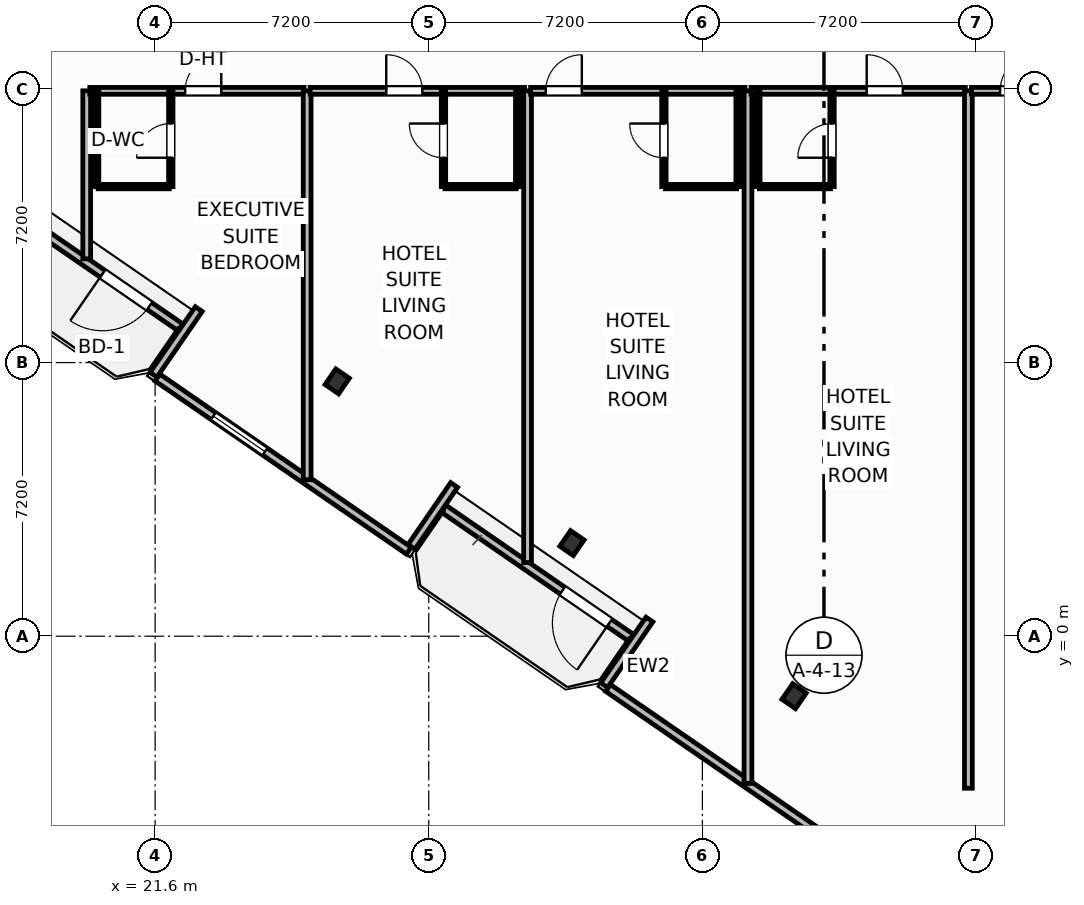
"""IFC4 building model, lengths in metres.
Left out: names, types, materials, properties, quantities, classifications, styles, units other than length and angle.
Written with IfcOpenShell. Run it as: python <this file> out.ifc"""

import sys

from ifc_helpers import new_model, si_unit, direction, frame, frame_2d, origin, origin_2d, place, context, subcontext, project, spatial, rectangle, i_section, extrude, element, fill, save


model = new_model("IFC4")
c1 = context("Model", 3, precision=1e-05, world=origin(), true_north=direction((0.0, 1.0)))
c2 = subcontext(c1, "Body", "Model", "MODEL_VIEW")
j1 = project(units=[si_unit("LENGTHUNIT", "METRE"), si_unit("PLANEANGLEUNIT", "RADIAN")], contexts=[c1])
p1 = place(None, origin())
s1 = spatial("IfcSite", under=j1, at=p1, CompositionType="ELEMENT")
p2 = place(p1, origin())
s2 = spatial("IfcBuilding", under=s1, at=p2, CompositionType="ELEMENT")
p3 = place(p2, frame((0.0, 0.0, 67.7)))
s3 = spatial("IfcBuildingStorey", under=s2, at=p3, CompositionType="ELEMENT", Elevation=67.7)
for number, where, z_axis, x_axis in (
    (1, (26.391, 6.705, 0.0), (0.0, 0.0, 1.0), (0.824, -0.567, 0.0)),
    (2, (32.568, 2.45, 0.0), (0.0, 0.0, 1.0), (0.824, -0.567, 0.0)),
    (3, (38.415, -1.577, 0.0), (0.0, 0.0, 1.0), (0.824, -0.567, 0.0)),
):
    element("IfcColumn", number, at=place(p3, frame(where, z_axis=z_axis, x_axis=x_axis)), inside=s3, PredefinedType="COLUMN", context=c2, shape_type="SweptSolid", body=[
        extrude(i_section(OverallWidth=0.432, OverallDepth=0.498, WebThickness=0.056, FlangeThickness=0.089, FilletRadius=0.025, at=origin_2d()), origin(), (0.0, 0.0, 1.0), 3.7),
    ])
p4 = place(p3, frame((22.269, 8.124, 0.0), z_axis=(0.0, 0.0, 1.0), x_axis=(-0.823534636215, 0.567265989598, 0.0)))
e4 = element("IfcWall", 4, at=p4, inside=s3, PredefinedType="SOLIDWALL", context=c2, shape_type="SweptSolid", body=[
    extrude(rectangle(XDim=6.0, YDim=0.22, at=frame_2d((3.0, 0.0))), origin(), (0.0, 0.0, 1.0), 2.66),
])
p5 = place(p4, frame((0.992, 0.0, 0.0)))
e5 = element("IfcOpeningElement", 5, at=p5, cuts=e4, PredefinedType="OPENING", context=c2, shape_type="SweptSolid", body=[
    extrude(rectangle(XDim=1.5, YDim=2.25, at=frame_2d((0.75, 1.125))), frame((0.0, 0.12, 0.0), z_axis=(0.0, -1.0, 0.0), x_axis=(1.0, 0.0, 0.0)), (0.0, 0.0, 1.0), 0.24),
])
p6 = place(p3, frame((34.127, -0.045, 0.0), z_axis=(0.0, 0.0, 1.0), x_axis=(-0.823534636215, 0.567265989598, 0.0)))
e6 = element("IfcWall", 6, at=p6, inside=s3, PredefinedType="SOLIDWALL", context=c2, shape_type="SweptSolid", body=[
    extrude(rectangle(XDim=6.0, YDim=0.22, at=frame_2d((3.0, 0.0))), origin(), (0.0, 0.0, 1.0), 2.66),
])
p7 = place(p6, frame((0.696, 0.0, 0.0)))
e7 = element("IfcOpeningElement", 7, at=p7, cuts=e6, PredefinedType="OPENING", context=c2, shape_type="SweptSolid", body=[
    extrude(rectangle(XDim=1.5, YDim=2.25, at=frame_2d((0.75, 1.125))), frame((0.0, 0.12, 0.0), z_axis=(0.0, -1.0, 0.0), x_axis=(1.0, 0.0, 0.0)), (0.0, 0.0, 1.0), 0.24),
])
p8 = place(p3, frame((22.747, 8.607, 0.0), z_axis=(0.0, 0.0, 1.0), x_axis=(-0.567219383419, -0.823566737474, 0.0)))
e8 = element("IfcWall", 8, at=p8, inside=s3, PredefinedType="SOLIDWALL", context=c2, shape_type="SweptSolid", body=[
    extrude(rectangle(XDim=2.1, YDim=0.22, at=frame_2d((1.05, 0.0))), origin(), (0.0, 0.0, 1.0), 2.66),
])
p9 = place(p3, frame((21.659, 6.807, 0.0), z_axis=(0.0, 0.0, 1.0), x_axis=(0.823535360023, -0.567264938799, 0.0)))
e9 = element("IfcWall", 9, at=p9, inside=s3, PredefinedType="SOLIDWALL", context=c2, shape_type="SweptSolid", body=[
    extrude(rectangle(XDim=8.035, YDim=0.22, at=frame_2d((4.018, 0.0))), origin(), (0.0, 0.0, 1.0), 2.66),
])
p10 = place(p9, frame((1.788, 0.0, 0.8)))
e10 = element("IfcOpeningElement", 10, at=p10, cuts=e9, PredefinedType="OPENING", context=c2, shape_type="SweptSolid", body=[
    extrude(rectangle(XDim=1.65, YDim=1.65, at=frame_2d((0.825, 0.825))), frame((0.0, 0.12, 0.0), z_axis=(0.0, -1.0, 0.0), x_axis=(1.0, 0.0, 0.0)), (0.0, 0.0, 1.0), 0.24),
])
p11 = place(p3, frame((28.347, 2.352, 0.0), z_axis=(0.0, 0.0, 1.0), x_axis=(0.567215821234, 0.823569190865, 0.0)))
e11 = element("IfcWall", 11, at=p11, inside=s3, PredefinedType="SOLIDWALL", context=c2, shape_type="SweptSolid", body=[
    extrude(rectangle(XDim=1.975, YDim=0.22, at=frame_2d((0.988, 0.0))), origin(), (0.0, 0.0, 1.0), 2.66),
])
p12 = place(p3, frame((34.606, 0.439, 0.0), z_axis=(0.0, 0.0, 1.0), x_axis=(-0.567219383419, -0.823566737474, 0.0)))
e12 = element("IfcWall", 12, at=p12, inside=s3, PredefinedType="SOLIDWALL", context=c2, shape_type="SweptSolid", body=[
    extrude(rectangle(XDim=2.1, YDim=0.22, at=frame_2d((1.05, 0.0))), origin(), (0.0, 0.0, 1.0), 2.66),
])
p13 = place(p3, frame((33.518, -1.362, 0.0), z_axis=(0.0, 0.0, 1.0), x_axis=(0.82353935489, -0.567259139148, 0.0)))
e13 = element("IfcWall", 13, at=p13, inside=s3, PredefinedType="SOLIDWALL", context=c2, shape_type="SweptSolid", body=[
    extrude(rectangle(XDim=23.147, YDim=0.22, at=frame_2d((11.573, 0.0))), origin(), (0.0, 0.0, 1.0), 2.66),
])
p14 = place(p13, frame((10.749, 0.0, 0.8)))
e14 = element("IfcOpeningElement", 14, at=p14, cuts=e13, PredefinedType="OPENING", context=c2, shape_type="SweptSolid", body=[
    extrude(rectangle(XDim=1.65, YDim=1.65, at=frame_2d((0.825, 0.825))), frame((0.0, 0.12, 0.0), z_axis=(0.0, -1.0, 0.0), x_axis=(1.0, 0.0, 0.0)), (0.0, 0.0, 1.0), 0.24),
])
p15 = place(p3, frame((19.8, 9.929, 0.0), z_axis=(0.0, 0.0, 1.0), x_axis=(0.0, 1.0, 0.0)))
e15 = element("IfcWall", 15, at=p15, inside=s3, PredefinedType="PARTITIONING", context=c2, shape_type="SweptSolid", body=[
    extrude(rectangle(XDim=4.421, YDim=0.205, at=frame_2d((2.21, 0.0))), origin(), (0.0, 0.0, 1.0), 3.38),
])
p16 = place(p3, frame((19.88, 14.35, 0.0), z_axis=(0.0, 0.0, 1.0), x_axis=(1.0, 0.0, 0.0)))
e16 = element("IfcWall", 16, at=p16, inside=s3, PredefinedType="PARTITIONING", context=c2, shape_type="SweptSolid", body=[
    extrude(rectangle(XDim=5.64, YDim=0.18, at=frame_2d((2.82, 0.0))), origin(), (0.0, 0.0, 1.0), 3.38),
])
p17 = place(p16, frame((2.51, 0.0, 0.0)))
e17 = element("IfcOpeningElement", 17, at=p17, cuts=e16, PredefinedType="OPENING", context=c2, shape_type="SweptSolid", body=[
    extrude(rectangle(XDim=0.95, YDim=2.15, at=frame_2d((0.475, 1.075))), frame((0.0, 0.1, 0.0), z_axis=(0.0, -1.0, 0.0), x_axis=(1.0, 0.0, 0.0)), (0.0, 0.0, 1.0), 0.2),
])
p18 = place(p3, frame((20.1, 11.83, 0.0), z_axis=(0.0, 0.0, 1.0), x_axis=(1.0, 0.0, 0.0)))
e18 = element("IfcWall", 18, at=p18, inside=s3, PredefinedType="PARTITIONING", context=c2, shape_type="SweptSolid", body=[
    extrude(rectangle(XDim=1.872, YDim=0.115, at=frame_2d((0.936, 0.0))), origin(), (0.0, 0.0, 1.0), 3.38),
])
p19 = place(p3, frame((22.012, 11.83, 0.0), z_axis=(0.0, 0.0, 1.0), x_axis=(0.0, 1.0, 0.0)))
e19 = element("IfcWall", 19, at=p19, inside=s3, PredefinedType="PARTITIONING", context=c2, shape_type="SweptSolid", body=[
    extrude(rectangle(XDim=2.52, YDim=0.115, at=frame_2d((1.26, 0.0))), origin(), (0.0, 0.0, 1.0), 3.38),
])
p20 = place(p19, frame((0.76, 0.0, 0.0)))
e20 = element("IfcOpeningElement", 20, at=p20, cuts=e19, PredefinedType="OPENING", context=c2, shape_type="SweptSolid", body=[
    extrude(rectangle(XDim=0.9, YDim=2.05, at=frame_2d((0.45, 1.025))), frame((0.0, 0.067, 0.0), z_axis=(0.0, -1.0, 0.0), x_axis=(1.0, 0.0, 0.0)), (0.0, 0.0, 1.0), 0.135),
])
p21 = place(p3, frame((20.06, 11.83, 0.0), z_axis=(0.0, 0.0, 1.0), x_axis=(0.0, 1.0, 0.0)))
e21 = element("IfcWall", 21, at=p21, inside=s3, PredefinedType="PARTITIONING", context=c2, shape_type="SweptSolid", body=[
    extrude(rectangle(XDim=2.52, YDim=0.115, at=frame_2d((1.26, 0.0))), origin(), (0.0, 0.0, 1.0), 3.38),
])
p22 = place(p3, frame((25.6, 4.117, 0.0), z_axis=(0.0, 0.0, 1.0), x_axis=(0.0, 1.0, 0.0)))
e22 = element("IfcWall", 22, at=p22, inside=s3, PredefinedType="PARTITIONING", context=c2, shape_type="SweptSolid", body=[
    extrude(rectangle(XDim=10.233, YDim=0.205, at=frame_2d((5.117, 0.0))), origin(), (0.0, 0.0, 1.0), 1.165),
])
p23 = place(p3, frame((25.68, 14.35, 0.0), z_axis=(0.0, 0.0, 1.0), x_axis=(1.0, 0.0, 0.0)))
e23 = element("IfcWall", 23, at=p23, inside=s3, PredefinedType="PARTITIONING", context=c2, shape_type="SweptSolid", body=[
    extrude(rectangle(XDim=5.64, YDim=0.18, at=frame_2d((2.82, 0.0))), origin(), (0.0, 0.0, 1.0), 3.38),
])
p24 = place(p23, frame((2.002, 0.0, 0.0)))
e24 = element("IfcOpeningElement", 24, at=p24, cuts=e23, PredefinedType="OPENING", context=c2, shape_type="SweptSolid", body=[
    extrude(rectangle(XDim=0.95, YDim=2.15, at=frame_2d((0.475, 1.075))), frame((0.0, 0.1, 0.0), z_axis=(0.0, -1.0, 0.0), x_axis=(1.0, 0.0, 0.0)), (0.0, 0.0, 1.0), 0.2),
])
p25 = place(p3, frame((29.228, 11.83, 0.0), z_axis=(0.0, 0.0, 1.0), x_axis=(1.0, 0.0, 0.0)))
e25 = element("IfcWall", 25, at=p25, inside=s3, PredefinedType="PARTITIONING", context=c2, shape_type="SweptSolid", body=[
    extrude(rectangle(XDim=1.872, YDim=0.115, at=frame_2d((0.936, 0.0))), origin(), (0.0, 0.0, 1.0), 3.38),
])
p26 = place(p3, frame((29.188, 11.83, 0.0), z_axis=(0.0, 0.0, 1.0), x_axis=(0.0, 1.0, 0.0)))
e26 = element("IfcWall", 26, at=p26, inside=s3, PredefinedType="PARTITIONING", context=c2, shape_type="SweptSolid", body=[
    extrude(rectangle(XDim=2.52, YDim=0.115, at=frame_2d((1.26, 0.0))), origin(), (0.0, 0.0, 1.0), 3.38),
])
p27 = place(p26, frame((0.76, 0.0, 0.0)))
e27 = element("IfcOpeningElement", 27, at=p27, cuts=e26, PredefinedType="OPENING", context=c2, shape_type="SweptSolid", body=[
    extrude(rectangle(XDim=0.9, YDim=2.05, at=frame_2d((0.45, 1.025))), frame((0.0, 0.067, 0.0), z_axis=(0.0, -1.0, 0.0), x_axis=(1.0, 0.0, 0.0)), (0.0, 0.0, 1.0), 0.135),
])
p28 = place(p3, frame((31.14, 11.83, 0.0), z_axis=(0.0, 0.0, 1.0), x_axis=(0.0, 1.0, 0.0)))
e28 = element("IfcWall", 28, at=p28, inside=s3, PredefinedType="PARTITIONING", context=c2, shape_type="SweptSolid", body=[
    extrude(rectangle(XDim=2.52, YDim=0.115, at=frame_2d((1.26, 0.0))), origin(), (0.0, 0.0, 1.0), 3.38),
])
p29 = place(p3, frame((31.4, 1.939, 0.0), z_axis=(0.0, 0.0, 1.0), x_axis=(0.0, 1.0, 0.0)))
e29 = element("IfcWall", 29, at=p29, inside=s3, PredefinedType="PARTITIONING", context=c2, shape_type="SweptSolid", body=[
    extrude(rectangle(XDim=12.411, YDim=0.205, at=frame_2d((6.206, 0.0))), origin(), (0.0, 0.0, 1.0), 3.38),
])
p30 = place(p3, frame((31.48, 14.35, 0.0), z_axis=(0.0, 0.0, 1.0), x_axis=(1.0, 0.0, 0.0)))
e30 = element("IfcWall", 30, at=p30, inside=s3, PredefinedType="PARTITIONING", context=c2, shape_type="SweptSolid", body=[
    extrude(rectangle(XDim=5.64, YDim=0.18, at=frame_2d((2.82, 0.0))), origin(), (0.0, 0.0, 1.0), 3.38),
])
p31 = place(p30, frame((0.398, 0.0, 0.0)))
e31 = element("IfcOpeningElement", 31, at=p31, cuts=e30, PredefinedType="OPENING", context=c2, shape_type="SweptSolid", body=[
    extrude(rectangle(XDim=0.95, YDim=2.15, at=frame_2d((0.475, 1.075))), frame((0.0, 0.1, 0.0), z_axis=(0.0, -1.0, 0.0), x_axis=(1.0, 0.0, 0.0)), (0.0, 0.0, 1.0), 0.2),
])
p32 = place(p3, frame((35.028, 11.83, 0.0), z_axis=(0.0, 0.0, 1.0), x_axis=(1.0, 0.0, 0.0)))
e32 = element("IfcWall", 32, at=p32, inside=s3, PredefinedType="PARTITIONING", context=c2, shape_type="SweptSolid", body=[
    extrude(rectangle(XDim=1.872, YDim=0.115, at=frame_2d((0.936, 0.0))), origin(), (0.0, 0.0, 1.0), 3.38),
])
p33 = place(p3, frame((34.988, 11.83, 0.0), z_axis=(0.0, 0.0, 1.0), x_axis=(0.0, 1.0, 0.0)))
e33 = element("IfcWall", 33, at=p33, inside=s3, PredefinedType="PARTITIONING", context=c2, shape_type="SweptSolid", body=[
    extrude(rectangle(XDim=2.52, YDim=0.115, at=frame_2d((1.26, 0.0))), origin(), (0.0, 0.0, 1.0), 3.38),
])
p34 = place(p33, frame((0.76, 0.0, 0.0)))
e34 = element("IfcOpeningElement", 34, at=p34, cuts=e33, PredefinedType="OPENING", context=c2, shape_type="SweptSolid", body=[
    extrude(rectangle(XDim=0.9, YDim=2.05, at=frame_2d((0.45, 1.025))), frame((0.0, 0.067, 0.0), z_axis=(0.0, -1.0, 0.0), x_axis=(1.0, 0.0, 0.0)), (0.0, 0.0, 1.0), 0.135),
])
p35 = place(p3, frame((36.94, 11.83, 0.0), z_axis=(0.0, 0.0, 1.0), x_axis=(0.0, 1.0, 0.0)))
e35 = element("IfcWall", 35, at=p35, inside=s3, PredefinedType="PARTITIONING", context=c2, shape_type="SweptSolid", body=[
    extrude(rectangle(XDim=2.52, YDim=0.115, at=frame_2d((1.26, 0.0))), origin(), (0.0, 0.0, 1.0), 3.38),
])
p36 = place(p3, frame((37.2, -3.874, 0.0), z_axis=(0.0, 0.0, 1.0), x_axis=(0.0, 1.0, 0.0)))
e36 = element("IfcWall", 36, at=p36, inside=s3, PredefinedType="PARTITIONING", context=c2, shape_type="SweptSolid", body=[
    extrude(rectangle(XDim=18.224, YDim=0.205, at=frame_2d((9.112, 0.0))), origin(), (0.0, 0.0, 1.0), 3.38),
])
p37 = place(p3, frame((37.28, 14.35, 0.0), z_axis=(0.0, 0.0, 1.0), x_axis=(1.0, 0.0, 0.0)))
e37 = element("IfcWall", 37, at=p37, inside=s3, PredefinedType="PARTITIONING", context=c2, shape_type="SweptSolid", body=[
    extrude(rectangle(XDim=5.64, YDim=0.18, at=frame_2d((2.82, 0.0))), origin(), (0.0, 0.0, 1.0), 3.38),
])
p38 = place(p37, frame((3.045, 0.0, 0.0)))
e38 = element("IfcOpeningElement", 38, at=p38, cuts=e37, PredefinedType="OPENING", context=c2, shape_type="SweptSolid", body=[
    extrude(rectangle(XDim=0.95, YDim=2.15, at=frame_2d((0.475, 1.075))), frame((0.0, 0.1, 0.0), z_axis=(0.0, -1.0, 0.0), x_axis=(1.0, 0.0, 0.0)), (0.0, 0.0, 1.0), 0.2),
])
p39 = place(p3, frame((37.5, 11.83, 0.0), z_axis=(0.0, 0.0, 1.0), x_axis=(1.0, 0.0, 0.0)))
e39 = element("IfcWall", 39, at=p39, inside=s3, PredefinedType="PARTITIONING", context=c2, shape_type="SweptSolid", body=[
    extrude(rectangle(XDim=1.872, YDim=0.115, at=frame_2d((0.936, 0.0))), origin(), (0.0, 0.0, 1.0), 3.38),
])
p40 = place(p3, frame((39.412, 11.83, 0.0), z_axis=(0.0, 0.0, 1.0), x_axis=(0.0, 1.0, 0.0)))
e40 = element("IfcWall", 40, at=p40, inside=s3, PredefinedType="PARTITIONING", context=c2, shape_type="SweptSolid", body=[
    extrude(rectangle(XDim=2.52, YDim=0.115, at=frame_2d((1.26, 0.0))), origin(), (0.0, 0.0, 1.0), 3.38),
])
p41 = place(p40, frame((0.76, 0.0, 0.0)))
e41 = element("IfcOpeningElement", 41, at=p41, cuts=e40, PredefinedType="OPENING", context=c2, shape_type="SweptSolid", body=[
    extrude(rectangle(XDim=0.9, YDim=2.05, at=frame_2d((0.45, 1.025))), frame((0.0, 0.067, 0.0), z_axis=(0.0, -1.0, 0.0), x_axis=(1.0, 0.0, 0.0)), (0.0, 0.0, 1.0), 0.135),
])
p42 = place(p3, frame((37.46, 11.83, 0.0), z_axis=(0.0, 0.0, 1.0), x_axis=(0.0, 1.0, 0.0)))
e42 = element("IfcWall", 42, at=p42, inside=s3, PredefinedType="PARTITIONING", context=c2, shape_type="SweptSolid", body=[
    extrude(rectangle(XDim=2.52, YDim=0.115, at=frame_2d((1.26, 0.0))), origin(), (0.0, 0.0, 1.0), 3.38),
])
p43 = place(p3, frame((43.0, -4.0, 0.0), z_axis=(0.0, 0.0, 1.0), x_axis=(0.0, 1.0, 0.0)))
e43 = element("IfcWall", 43, at=p43, inside=s3, PredefinedType="PARTITIONING", context=c2, shape_type="SweptSolid", body=[
    extrude(rectangle(XDim=18.35, YDim=0.205, at=frame_2d((9.175, 0.0))), origin(), (0.0, 0.0, 1.0), 1.165),
])
p44 = place(p3, frame((43.08, 14.35, 0.0), z_axis=(0.0, 0.0, 1.0), x_axis=(1.0, 0.0, 0.0)))
e44 = element("IfcWall", 44, at=p44, inside=s3, PredefinedType="PARTITIONING", context=c2, shape_type="SweptSolid", body=[
    extrude(rectangle(XDim=5.64, YDim=0.18, at=frame_2d((2.82, 0.0))), origin(), (0.0, 0.0, 1.0), 3.38),
])
p45 = place(p44, frame((0.754, 0.0, 0.0)))
e45 = element("IfcOpeningElement", 45, at=p45, cuts=e44, PredefinedType="OPENING", context=c2, shape_type="SweptSolid", body=[
    extrude(rectangle(XDim=0.95, YDim=2.15, at=frame_2d((0.475, 1.075))), frame((0.0, 0.1, 0.0), z_axis=(0.0, -1.0, 0.0), x_axis=(1.0, 0.0, 0.0)), (0.0, 0.0, 1.0), 0.2),
])
p46 = place(p5, origin())
e46 = element("IfcDoor", 46, at=p46, inside=s3, OperationType="SINGLE_SWING_RIGHT", PredefinedType="DOOR", context=c2, shape_type="SweptSolid", body=[
    extrude(rectangle(XDim=1.5, YDim=2.25, at=frame_2d((0.75, 1.125))), frame((0.0, 0.025, 0.0), z_axis=(0.0, -1.0, 0.0), x_axis=(1.0, 0.0, 0.0)), (0.0, 0.0, 1.0), 0.05),
])
fill(e5, e46)
p47 = place(p7, origin())
e47 = element("IfcDoor", 47, at=p47, inside=s3, OperationType="SINGLE_SWING_LEFT", PredefinedType="DOOR", context=c2, shape_type="SweptSolid", body=[
    extrude(rectangle(XDim=1.5, YDim=2.25, at=frame_2d((0.75, 1.125))), frame((0.0, 0.025, 0.0), z_axis=(0.0, -1.0, 0.0), x_axis=(1.0, 0.0, 0.0)), (0.0, 0.0, 1.0), 0.05),
])
fill(e7, e47)
p48 = place(p10, origin())
e48 = element("IfcWindow", 48, at=p48, inside=s3, PartitioningType="SINGLE_PANEL", PredefinedType="WINDOW", context=c2, shape_type="SweptSolid", body=[
    extrude(rectangle(XDim=1.65, YDim=1.65, at=frame_2d((0.825, 0.825))), frame((0.0, 0.03, 0.0), z_axis=(0.0, -1.0, 0.0), x_axis=(1.0, 0.0, 0.0)), (0.0, 0.0, 1.0), 0.06),
])
fill(e10, e48)
p49 = place(p17, origin())
e49 = element("IfcDoor", 49, at=p49, inside=s3, OperationType="SINGLE_SWING_RIGHT", PredefinedType="DOOR", context=c2, shape_type="SweptSolid", body=[
    extrude(rectangle(XDim=0.95, YDim=2.15, at=frame_2d((0.475, 1.075))), frame((0.0, 0.025, 0.0), z_axis=(0.0, -1.0, 0.0), x_axis=(1.0, 0.0, 0.0)), (0.0, 0.0, 1.0), 0.05),
])
fill(e17, e49)
p50 = place(p20, origin())
e50 = element("IfcDoor", 50, at=p50, inside=s3, OperationType="SINGLE_SWING_LEFT", PredefinedType="DOOR", context=c2, shape_type="SweptSolid", body=[
    extrude(rectangle(XDim=0.9, YDim=2.05, at=frame_2d((0.45, 1.025))), frame((0.0, 0.025, 0.0), z_axis=(0.0, -1.0, 0.0), x_axis=(1.0, 0.0, 0.0)), (0.0, 0.0, 1.0), 0.05),
])
fill(e20, e50)
p51 = place(p24, origin())
e51 = element("IfcDoor", 51, at=p51, inside=s3, OperationType="SINGLE_SWING_LEFT", PredefinedType="DOOR", context=c2, shape_type="SweptSolid", body=[
    extrude(rectangle(XDim=0.95, YDim=2.15, at=frame_2d((0.475, 1.075))), frame((0.0, 0.025, 0.0), z_axis=(0.0, -1.0, 0.0), x_axis=(1.0, 0.0, 0.0)), (0.0, 0.0, 1.0), 0.05),
])
fill(e24, e51)
p52 = place(p27, origin())
e52 = element("IfcDoor", 52, at=p52, inside=s3, OperationType="SINGLE_SWING_RIGHT", PredefinedType="DOOR", context=c2, shape_type="SweptSolid", body=[
    extrude(rectangle(XDim=0.9, YDim=2.05, at=frame_2d((0.45, 1.025))), frame((0.0, 0.025, 0.0), z_axis=(0.0, -1.0, 0.0), x_axis=(1.0, 0.0, 0.0)), (0.0, 0.0, 1.0), 0.05),
])
fill(e27, e52)
p53 = place(p31, origin())
e53 = element("IfcDoor", 53, at=p53, inside=s3, OperationType="SINGLE_SWING_RIGHT", PredefinedType="DOOR", context=c2, shape_type="SweptSolid", body=[
    extrude(rectangle(XDim=0.95, YDim=2.15, at=frame_2d((0.475, 1.075))), frame((0.0, 0.025, 0.0), z_axis=(0.0, -1.0, 0.0), x_axis=(1.0, 0.0, 0.0)), (0.0, 0.0, 1.0), 0.05),
])
fill(e31, e53)
p54 = place(p34, origin())
e54 = element("IfcDoor", 54, at=p54, inside=s3, OperationType="SINGLE_SWING_RIGHT", PredefinedType="DOOR", context=c2, shape_type="SweptSolid", body=[
    extrude(rectangle(XDim=0.9, YDim=2.05, at=frame_2d((0.45, 1.025))), frame((0.0, 0.025, 0.0), z_axis=(0.0, -1.0, 0.0), x_axis=(1.0, 0.0, 0.0)), (0.0, 0.0, 1.0), 0.05),
])
fill(e34, e54)
p55 = place(p38, origin())
e55 = element("IfcDoor", 55, at=p55, inside=s3, OperationType="SINGLE_SWING_LEFT", PredefinedType="DOOR", context=c2, shape_type="SweptSolid", body=[
    extrude(rectangle(XDim=0.95, YDim=2.15, at=frame_2d((0.475, 1.075))), frame((0.0, 0.025, 0.0), z_axis=(0.0, -1.0, 0.0), x_axis=(1.0, 0.0, 0.0)), (0.0, 0.0, 1.0), 0.05),
])
fill(e38, e55)
p56 = place(p41, origin())
e56 = element("IfcDoor", 56, at=p56, inside=s3, OperationType="SINGLE_SWING_LEFT", PredefinedType="DOOR", context=c2, shape_type="SweptSolid", body=[
    extrude(rectangle(XDim=0.9, YDim=2.05, at=frame_2d((0.45, 1.025))), frame((0.0, 0.025, 0.0), z_axis=(0.0, -1.0, 0.0), x_axis=(1.0, 0.0, 0.0)), (0.0, 0.0, 1.0), 0.05),
])
fill(e41, e56)
p57 = place(p45, origin())
e57 = element("IfcDoor", 57, at=p57, inside=s3, OperationType="SINGLE_SWING_RIGHT", PredefinedType="DOOR", context=c2, shape_type="SweptSolid", body=[
    extrude(rectangle(XDim=0.95, YDim=2.15, at=frame_2d((0.475, 1.075))), frame((0.0, 0.025, 0.0), z_axis=(0.0, -1.0, 0.0), x_axis=(1.0, 0.0, 0.0)), (0.0, 0.0, 1.0), 0.05),
])
fill(e45, e57)
save(model, sys.argv[1])
